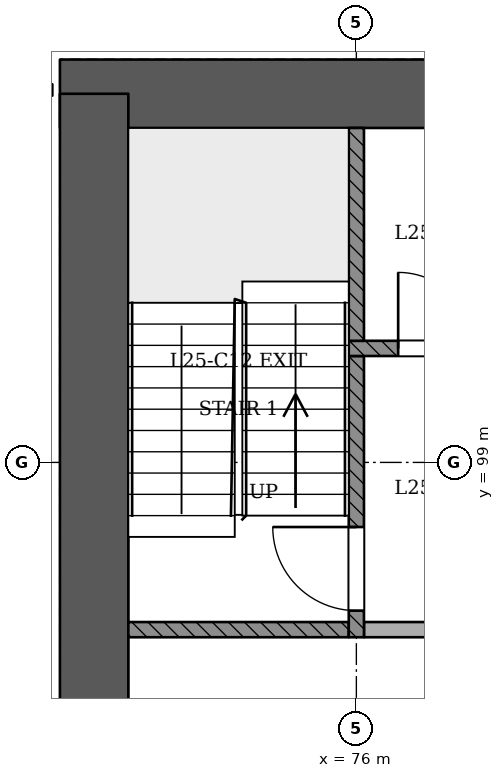
"""IFC4 building model, lengths in metres.
Left out: names, types, materials, properties, quantities, classifications, styles, units other than length and angle.
Written with IfcOpenShell. Run it as: python <this file> out.ifc"""

import sys

from ifc_helpers import new_model, si_unit, direction, frame, frame_2d, origin, place, context, subcontext, project, spatial, rectangle, extrude, element, fill, save


model = new_model("IFC4")
c1 = context("Model", 3, precision=1e-05, world=origin(), true_north=direction((0.0, 1.0)))
c2 = subcontext(c1, "Body", "Model", "MODEL_VIEW")
j1 = project(units=[si_unit("LENGTHUNIT", "METRE"), si_unit("PLANEANGLEUNIT", "RADIAN")], contexts=[c1])
p1 = place(None, origin())
s1 = spatial("IfcSite", under=j1, at=p1, CompositionType="ELEMENT")
p2 = place(p1, origin())
s2 = spatial("IfcBuilding", under=s1, at=p2, CompositionType="ELEMENT")
p3 = place(p2, frame((0.0, 0.0, 100.8)))
s3 = spatial("IfcBuildingStorey", under=s2, at=p3, CompositionType="ELEMENT", Elevation=100.8)
p4 = place(p3, frame((97.45, 103.85, 0.0), z_axis=(0.0, 0.0, 1.0), x_axis=(-1.0, 0.0, 0.0)))
e1 = element("IfcWall", 1, at=p4, inside=s3, PredefinedType="SHEAR", context=c2, shape_type="SweptSolid", body=[
    extrude(rectangle(XDim=25.35, YDim=0.9, at=frame_2d((12.675, 0.0))), origin(), (0.0, 0.0, 1.0), 3.6),
])
p5 = place(p3, frame((72.55, 103.85, 0.0), z_axis=(0.0, 0.0, 1.0), x_axis=(0.0, -1.0, 0.0)))
e2 = element("IfcWall", 2, at=p5, inside=s3, PredefinedType="SHEAR", context=c2, shape_type="SweptSolid", body=[
    extrude(rectangle(XDim=11.35, YDim=0.9, at=frame_2d((5.675, 0.0))), origin(), (0.0, 0.0, 1.0), 3.6),
])
p6 = place(p3, frame((63.623, 97.706, 0.0), z_axis=(0.0, 0.0, 1.0), x_axis=(0.500000781663, -0.866024952491, 0.0)))
e3 = element("IfcWall", 3, at=p6, inside=s3, PredefinedType="PARTITIONING", context=c2, shape_type="SweptSolid", body=[
    extrude(rectangle(XDim=41.837, YDim=0.15, at=frame_2d((20.919, 0.0))), origin(), (0.0, 0.0, 1.0), 2.7),
])
p7 = place(p6, frame((2.912, 0.0, 0.0)))
e4 = element("IfcOpeningElement", 4, at=p7, cuts=e3, PredefinedType="OPENING", context=c2, shape_type="SweptSolid", body=[
    extrude(rectangle(XDim=1.2, YDim=2.1, at=frame_2d((0.6, 1.05))), frame((0.0, 0.085, 0.0), z_axis=(0.0, -1.0, 0.0), x_axis=(1.0, 0.0, 0.0)), (0.0, 0.0, 1.0), 0.171),
])
p8 = place(p6, frame((10.198, 0.0, 0.0)))
e5 = element("IfcOpeningElement", 5, at=p8, cuts=e3, PredefinedType="OPENING", context=c2, shape_type="SweptSolid", body=[
    extrude(rectangle(XDim=1.0, YDim=2.1, at=frame_2d((0.5, 1.05))), frame((0.0, 0.085, 0.0), z_axis=(0.0, -1.0, 0.0), x_axis=(1.0, 0.0, 0.0)), (0.0, 0.0, 1.0), 0.171),
])
p9 = place(p6, frame((12.523, 0.0, 0.0)))
e6 = element("IfcOpeningElement", 6, at=p9, cuts=e3, PredefinedType="OPENING", context=c2, shape_type="SweptSolid", body=[
    extrude(rectangle(XDim=1.0, YDim=2.1, at=frame_2d((0.5, 1.05))), frame((0.0, 0.085, 0.0), z_axis=(0.0, -1.0, 0.0), x_axis=(1.0, 0.0, 0.0)), (0.0, 0.0, 1.0), 0.171),
])
p10 = place(p6, frame((19.314, 0.0, 0.0)))
e7 = element("IfcOpeningElement", 7, at=p10, cuts=e3, PredefinedType="OPENING", context=c2, shape_type="SweptSolid", body=[
    extrude(rectangle(XDim=1.0, YDim=2.1, at=frame_2d((0.5, 1.05))), frame((0.0, 0.085, 0.0), z_axis=(0.0, -1.0, 0.0), x_axis=(1.0, 0.0, 0.0)), (0.0, 0.0, 1.0), 0.171),
])
p11 = place(p6, frame((21.639, 0.0, 0.0)))
e8 = element("IfcOpeningElement", 8, at=p11, cuts=e3, PredefinedType="OPENING", context=c2, shape_type="SweptSolid", body=[
    extrude(rectangle(XDim=1.0, YDim=2.1, at=frame_2d((0.5, 1.05))), frame((0.0, 0.085, 0.0), z_axis=(0.0, -1.0, 0.0), x_axis=(1.0, 0.0, 0.0)), (0.0, 0.0, 1.0), 0.171),
])
p12 = place(p6, frame((27.169, 0.0, 0.0)))
e9 = element("IfcOpeningElement", 9, at=p12, cuts=e3, PredefinedType="OPENING", context=c2, shape_type="SweptSolid", body=[
    extrude(rectangle(XDim=1.0, YDim=2.1, at=frame_2d((0.5, 1.05))), frame((0.0, 0.085, 0.0), z_axis=(0.0, -1.0, 0.0), x_axis=(1.0, 0.0, 0.0)), (0.0, 0.0, 1.0), 0.171),
])
p13 = place(p6, frame((30.523, 0.0, 0.0)))
e10 = element("IfcOpeningElement", 10, at=p13, cuts=e3, PredefinedType="OPENING", context=c2, shape_type="SweptSolid", body=[
    extrude(rectangle(XDim=1.0, YDim=2.1, at=frame_2d((0.5, 1.05))), frame((0.0, 0.085, 0.0), z_axis=(0.0, -1.0, 0.0), x_axis=(1.0, 0.0, 0.0)), (0.0, 0.0, 1.0), 0.171),
])
p14 = place(p6, frame((37.725, 0.0, 0.0)))
e11 = element("IfcOpeningElement", 11, at=p14, cuts=e3, PredefinedType="OPENING", context=c2, shape_type="SweptSolid", body=[
    extrude(rectangle(XDim=1.2, YDim=2.1, at=frame_2d((0.6, 1.05))), frame((0.0, 0.085, 0.0), z_axis=(0.0, -1.0, 0.0), x_axis=(1.0, 0.0, 0.0)), (0.0, 0.0, 1.0), 0.171),
])
p15 = place(p3, frame((73.0, 96.8, 0.0), z_axis=(0.0, 0.0, 1.0), x_axis=(1.0, 0.0, 0.0)))
e12 = element("IfcWall", 12, at=p15, inside=s3, PredefinedType="SOLIDWALL", context=c2, shape_type="SweptSolid", body=[
    extrude(rectangle(XDim=2.9, YDim=0.2, at=frame_2d((1.45, 0.0))), origin(), (0.0, 0.0, 1.0), 3.1),
])
p16 = place(p3, frame((76.0, 96.7, 0.0), z_axis=(0.0, 0.0, 1.0), x_axis=(0.0, 1.0, 0.0)))
e13 = element("IfcWall", 13, at=p16, inside=s3, PredefinedType="SOLIDWALL", context=c2, shape_type="SweptSolid", body=[
    extrude(rectangle(XDim=3.7, YDim=0.2, at=frame_2d((1.85, 0.0))), origin(), (0.0, 0.0, 1.0), 3.1),
])
p17 = place(p16, frame((0.35, 0.0, 0.0)))
e14 = element("IfcOpeningElement", 14, at=p17, cuts=e13, PredefinedType="OPENING", context=c2, shape_type="SweptSolid", body=[
    extrude(rectangle(XDim=1.1, YDim=2.1, at=frame_2d((0.55, 1.05))), frame((0.0, 0.11, 0.0), z_axis=(0.0, -1.0, 0.0), x_axis=(1.0, 0.0, 0.0)), (0.0, 0.0, 1.0), 0.221),
])
p18 = place(p3, frame((76.1, 96.8, 0.0), z_axis=(0.0, 0.0, 1.0), x_axis=(1.0, 0.0, 0.0)))
e15 = element("IfcWall", 15, at=p18, inside=s3, PredefinedType="PARTITIONING", context=c2, shape_type="SweptSolid", body=[
    extrude(rectangle(XDim=1.9, YDim=0.2, at=frame_2d((0.95, 0.0))), origin(), (0.0, 0.0, 1.0), 3.1),
])
p19 = place(p3, frame((75.9, 100.5, 0.0), z_axis=(0.0, 0.0, 1.0), x_axis=(1.0, 0.0, 0.0)))
e16 = element("IfcWall", 16, at=p19, inside=s3, PredefinedType="SOLIDWALL", context=c2, shape_type="SweptSolid", body=[
    extrude(rectangle(XDim=18.2, YDim=0.2, at=frame_2d((9.1, 0.0))), origin(), (0.0, 0.0, 1.0), 3.1),
])
p20 = place(p19, frame((2.6, 0.0, 0.0)))
e17 = element("IfcOpeningElement", 17, at=p20, cuts=e16, PredefinedType="OPENING", context=c2, shape_type="SweptSolid", body=[
    extrude(rectangle(XDim=1.1, YDim=2.1, at=frame_2d((0.55, 1.05))), frame((0.0, 0.11, 0.0), z_axis=(0.0, -1.0, 0.0), x_axis=(1.0, 0.0, 0.0)), (0.0, 0.0, 1.0), 0.221),
])
p21 = place(p19, frame((4.5, 0.0, 0.0)))
e18 = element("IfcOpeningElement", 18, at=p21, cuts=e16, PredefinedType="OPENING", context=c2, shape_type="SweptSolid", body=[
    extrude(rectangle(XDim=1.1, YDim=2.1, at=frame_2d((0.55, 1.05))), frame((0.0, 0.11, 0.0), z_axis=(0.0, -1.0, 0.0), x_axis=(1.0, 0.0, 0.0)), (0.0, 0.0, 1.0), 0.221),
])
p22 = place(p19, frame((6.4, 0.0, 0.0)))
e19 = element("IfcOpeningElement", 19, at=p22, cuts=e16, PredefinedType="OPENING", context=c2, shape_type="SweptSolid", body=[
    extrude(rectangle(XDim=1.1, YDim=2.1, at=frame_2d((0.55, 1.05))), frame((0.0, 0.11, 0.0), z_axis=(0.0, -1.0, 0.0), x_axis=(1.0, 0.0, 0.0)), (0.0, 0.0, 1.0), 0.221),
])
p23 = place(p19, frame((8.3, 0.0, 0.0)))
e20 = element("IfcOpeningElement", 20, at=p23, cuts=e16, PredefinedType="OPENING", context=c2, shape_type="SweptSolid", body=[
    extrude(rectangle(XDim=1.1, YDim=2.1, at=frame_2d((0.55, 1.05))), frame((0.0, 0.11, 0.0), z_axis=(0.0, -1.0, 0.0), x_axis=(1.0, 0.0, 0.0)), (0.0, 0.0, 1.0), 0.221),
])
p24 = place(p19, frame((10.2, 0.0, 0.0)))
e21 = element("IfcOpeningElement", 21, at=p24, cuts=e16, PredefinedType="OPENING", context=c2, shape_type="SweptSolid", body=[
    extrude(rectangle(XDim=1.1, YDim=2.1, at=frame_2d((0.55, 1.05))), frame((0.0, 0.11, 0.0), z_axis=(0.0, -1.0, 0.0), x_axis=(1.0, 0.0, 0.0)), (0.0, 0.0, 1.0), 0.221),
])
p25 = place(p19, frame((12.1, 0.0, 0.0)))
e22 = element("IfcOpeningElement", 22, at=p25, cuts=e16, PredefinedType="OPENING", context=c2, shape_type="SweptSolid", body=[
    extrude(rectangle(XDim=1.1, YDim=2.1, at=frame_2d((0.55, 1.05))), frame((0.0, 0.11, 0.0), z_axis=(0.0, -1.0, 0.0), x_axis=(1.0, 0.0, 0.0)), (0.0, 0.0, 1.0), 0.221),
])
p26 = place(p19, frame((14.0, 0.0, 0.0)))
e23 = element("IfcOpeningElement", 23, at=p26, cuts=e16, PredefinedType="OPENING", context=c2, shape_type="SweptSolid", body=[
    extrude(rectangle(XDim=1.1, YDim=2.1, at=frame_2d((0.55, 1.05))), frame((0.0, 0.11, 0.0), z_axis=(0.0, -1.0, 0.0), x_axis=(1.0, 0.0, 0.0)), (0.0, 0.0, 1.0), 0.221),
])
p27 = place(p19, frame((0.65, 0.0, 0.0)))
e24 = element("IfcOpeningElement", 24, at=p27, cuts=e16, PredefinedType="OPENING", context=c2, shape_type="SweptSolid", body=[
    extrude(rectangle(XDim=1.0, YDim=2.1, at=frame_2d((0.5, 1.05))), frame((0.0, 0.11, 0.0), z_axis=(0.0, -1.0, 0.0), x_axis=(1.0, 0.0, 0.0)), (0.0, 0.0, 1.0), 0.221),
])
p28 = place(p19, frame((16.3, 0.0, 0.0)))
e25 = element("IfcOpeningElement", 25, at=p28, cuts=e16, PredefinedType="OPENING", context=c2, shape_type="SweptSolid", body=[
    extrude(rectangle(XDim=1.0, YDim=2.1, at=frame_2d((0.5, 1.05))), frame((0.0, 0.11, 0.0), z_axis=(0.0, -1.0, 0.0), x_axis=(1.0, 0.0, 0.0)), (0.0, 0.0, 1.0), 0.221),
])
p29 = place(p3, frame((76.0, 100.6, 0.0), z_axis=(0.0, 0.0, 1.0), x_axis=(0.0, 1.0, 0.0)))
e26 = element("IfcWall", 26, at=p29, inside=s3, PredefinedType="SOLIDWALL", context=c2, shape_type="SweptSolid", body=[
    extrude(rectangle(XDim=2.8, YDim=0.2, at=frame_2d((1.4, 0.0))), origin(), (0.0, 0.0, 1.0), 3.1),
])
p30 = place(p17, origin())
e27 = element("IfcDoor", 27, at=p30, inside=s3, OperationType="SINGLE_SWING_RIGHT", PredefinedType="NOTDEFINED", context=c2, shape_type="SweptSolid", body=[
    extrude(rectangle(XDim=1.1, YDim=2.1, at=frame_2d((0.55, 1.05))), frame((0.0, 0.025, 0.0), z_axis=(0.0, -1.0, 0.0), x_axis=(1.0, 0.0, 0.0)), (0.0, 0.0, 1.0), 0.05),
])
fill(e14, e27)
p31 = place(p27, origin())
e28 = element("IfcDoor", 28, at=p31, inside=s3, OperationType="SINGLE_SWING_LEFT", PredefinedType="NOTDEFINED", context=c2, shape_type="SweptSolid", body=[
    extrude(rectangle(XDim=1.0, YDim=2.1, at=frame_2d((0.5, 1.05))), frame((0.0, 0.025, 0.0), z_axis=(0.0, -1.0, 0.0), x_axis=(1.0, 0.0, 0.0)), (0.0, 0.0, 1.0), 0.05),
])
fill(e24, e28)
save(model, sys.argv[1])
